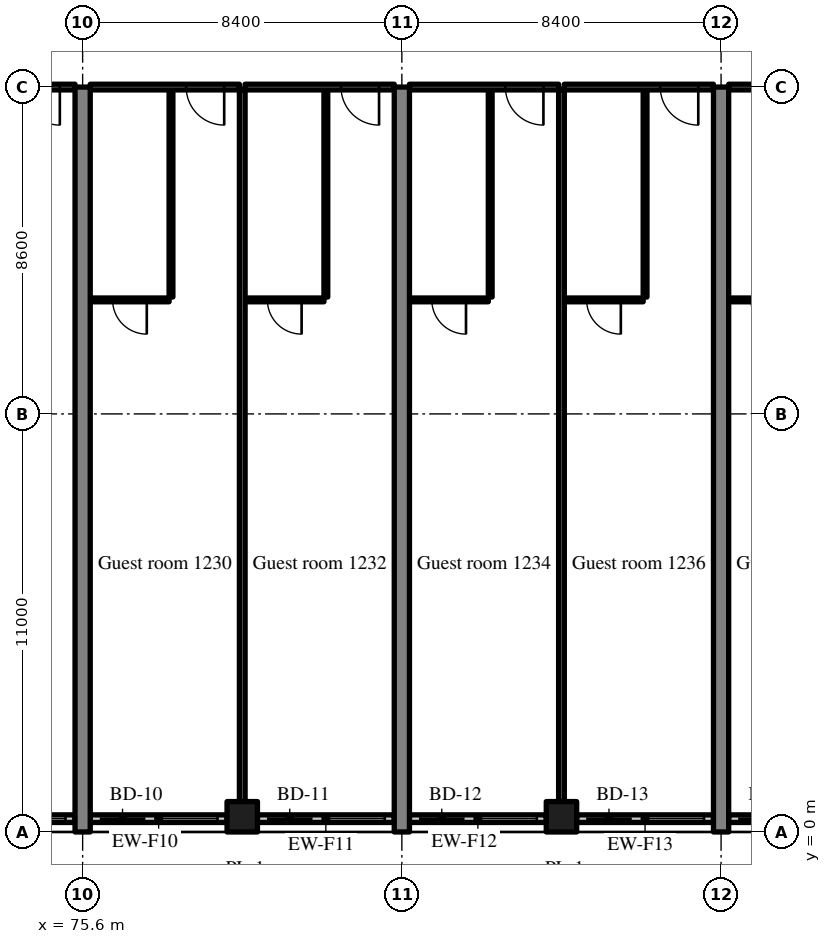
"""IFC4 building model, lengths in metres.
Left out: names, types, materials, properties, quantities, classifications, styles, units other than length and angle.
Written with IfcOpenShell. Run it as: python <this file> out.ifc"""

import sys

from ifc_helpers import new_model, si_unit, direction, frame, frame_2d, origin, origin_2d, place, context, subcontext, project, spatial, rectangle, extrude, source, transform, mapped, element, fill, save


model = new_model("IFC4")
c1 = context("Model", 3, precision=1e-05, world=origin(), true_north=direction((0.0, 1.0)))
c2 = subcontext(c1, "Body", "Model", "MODEL_VIEW")
j1 = project(units=[si_unit("LENGTHUNIT", "METRE"), si_unit("PLANEANGLEUNIT", "RADIAN")], contexts=[c1])
p1 = place(None, origin())
s1 = spatial("IfcSite", under=j1, at=p1, CompositionType="ELEMENT")
p2 = place(p1, origin())
s2 = spatial("IfcBuilding", under=s1, at=p2, CompositionType="ELEMENT")
p3 = place(p2, frame((0.0, 0.0, 54.4)))
s3 = spatial("IfcBuildingStorey", under=s2, at=p3, CompositionType="ELEMENT", Elevation=54.4)
m1 = source(origin(), c2, "Body", "SweptSolid", [
    extrude(rectangle(XDim=19.6, YDim=0.4, at=frame_2d((9.8, 0.0))), origin(), (0.0, 0.0, 1.0), 3.52),
])
for number, where, z_axis, x_axis in (
    (1, (75.6, 0.0, 0.0), (0.0, 0.0, 1.0), (0.0, 1.0, 0.0)),
    (2, (84.0, 0.0, 0.0), (0.0, 0.0, 1.0), (0.0, 1.0, 0.0)),
    (3, (92.4, 0.0, 0.0), (0.0, 0.0, 1.0), (0.0, 1.0, 0.0)),
):
    element("IfcWall", number, at=place(p3, frame(where, z_axis=z_axis, x_axis=x_axis)), inside=s3, PredefinedType="SHEAR", context=c2, shape_type="MappedRepresentation", body=[
        mapped(m1, transform((0.0, 0.0, 0.0), scale=1.0)),
    ])
m2 = source(origin(), c2, "Body", "SweptSolid", [
    extrude(rectangle(XDim=0.8, YDim=0.8, at=origin_2d()), origin(), (0.0, 0.0, 1.0), 3.52),
])
for number, where, z_axis, x_axis in (
    (4, (79.8, 0.4, 0.0), (0.0, 0.0, 1.0), (1.0, 0.0, 0.0)),
    (5, (88.2, 0.4, 0.0), (0.0, 0.0, 1.0), (1.0, 0.0, 0.0)),
):
    element("IfcColumn", number, at=place(p3, frame(where, z_axis=z_axis, x_axis=x_axis)), inside=s3, PredefinedType="COLUMN", context=c2, shape_type="MappedRepresentation", body=[
        mapped(m2, transform((0.0, 0.0, 0.0), scale=1.0)),
    ])
m3 = source(origin(), c2, "Body", "SweptSolid", [
    extrude(rectangle(XDim=3.6, YDim=0.2, at=frame_2d((1.8, 0.0))), origin(), (0.0, 0.0, 1.0), 2.82),
])
p4 = place(p3, frame((71.8, 0.35, 0.0), z_axis=(0.0, 0.0, 1.0), x_axis=(1.0, 0.0, 0.0)))
e6 = element("IfcWall", 6, at=p4, inside=s3, PredefinedType="SOLIDWALL", context=c2, shape_type="MappedRepresentation", body=[
    mapped(m3, transform((0.0, 0.0, 0.0), scale=1.0)),
])
m4 = source(origin(), c2, "Body", "SweptSolid", [
    extrude(rectangle(XDim=1.2, YDim=2.4, at=frame_2d((0.6, 1.2))), frame((0.0, 0.11, 0.0), z_axis=(0.0, -1.0, 0.0), x_axis=(1.0, 0.0, 0.0)), (0.0, 0.0, 1.0), 0.22),
])
p5 = place(p4, frame((0.25, 0.0, 0.0)))
e7 = element("IfcOpeningElement", 7, at=p5, cuts=e6, PredefinedType="OPENING", context=c2, shape_type="MappedRepresentation", body=[
    mapped(m4, transform((0.0, 0.0, 0.0), scale=1.0)),
])
m5 = source(origin(), c2, "Body", "SweptSolid", [
    extrude(rectangle(XDim=1.5, YDim=1.5, at=frame_2d((0.75, 0.75))), frame((0.0, 0.11, 0.0), z_axis=(0.0, -1.0, 0.0), x_axis=(1.0, 0.0, 0.0)), (0.0, 0.0, 1.0), 0.22),
])
p6 = place(p4, frame((1.85, 0.0, 0.9)))
e8 = element("IfcOpeningElement", 8, at=p6, cuts=e6, PredefinedType="OPENING", context=c2, shape_type="MappedRepresentation", body=[
    mapped(m5, transform((0.0, 0.0, 0.0), scale=1.0)),
])
p7 = place(p3, frame((75.8, 0.35, 0.0), z_axis=(0.0, 0.0, 1.0), x_axis=(1.0, 0.0, 0.0)))
e9 = element("IfcWall", 9, at=p7, inside=s3, PredefinedType="SOLIDWALL", context=c2, shape_type="MappedRepresentation", body=[
    mapped(m3, transform((0.0, 0.0, 0.0), scale=1.0)),
])
p8 = place(p7, frame((0.25, 0.0, 0.0)))
e10 = element("IfcOpeningElement", 10, at=p8, cuts=e9, PredefinedType="OPENING", context=c2, shape_type="MappedRepresentation", body=[
    mapped(m4, transform((0.0, 0.0, 0.0), scale=1.0)),
])
p9 = place(p7, frame((1.85, 0.0, 0.9)))
e11 = element("IfcOpeningElement", 11, at=p9, cuts=e9, PredefinedType="OPENING", context=c2, shape_type="MappedRepresentation", body=[
    mapped(m5, transform((0.0, 0.0, 0.0), scale=1.0)),
])
m6 = source(origin(), c2, "Body", "SweptSolid", [
    extrude(rectangle(XDim=3.6, YDim=0.2, at=frame_2d((1.8, 0.0))), origin(), (0.0, 0.0, 1.0), 2.82),
])
p10 = place(p3, frame((80.2, 0.35, 0.0), z_axis=(0.0, 0.0, 1.0), x_axis=(1.0, 0.0, 0.0)))
e12 = element("IfcWall", 12, at=p10, inside=s3, PredefinedType="SOLIDWALL", context=c2, shape_type="MappedRepresentation", body=[
    mapped(m6, transform((0.0, 0.0, 0.0), scale=1.0)),
])
p11 = place(p10, frame((0.25, 0.0, 0.0)))
e13 = element("IfcOpeningElement", 13, at=p11, cuts=e12, PredefinedType="OPENING", context=c2, shape_type="MappedRepresentation", body=[
    mapped(m4, transform((0.0, 0.0, 0.0), scale=1.0)),
])
p12 = place(p10, frame((1.85, 0.0, 0.9)))
e14 = element("IfcOpeningElement", 14, at=p12, cuts=e12, PredefinedType="OPENING", context=c2, shape_type="MappedRepresentation", body=[
    mapped(m5, transform((0.0, 0.0, 0.0), scale=1.0)),
])
p13 = place(p3, frame((84.2, 0.35, 0.0), z_axis=(0.0, 0.0, 1.0), x_axis=(1.0, 0.0, 0.0)))
e15 = element("IfcWall", 15, at=p13, inside=s3, PredefinedType="SOLIDWALL", context=c2, shape_type="MappedRepresentation", body=[
    mapped(m6, transform((0.0, 0.0, 0.0), scale=1.0)),
])
p14 = place(p13, frame((0.25, 0.0, 0.0)))
e16 = element("IfcOpeningElement", 16, at=p14, cuts=e15, PredefinedType="OPENING", context=c2, shape_type="MappedRepresentation", body=[
    mapped(m4, transform((0.0, 0.0, 0.0), scale=1.0)),
])
p15 = place(p13, frame((1.85, 0.0, 0.9)))
e17 = element("IfcOpeningElement", 17, at=p15, cuts=e15, PredefinedType="OPENING", context=c2, shape_type="MappedRepresentation", body=[
    mapped(m5, transform((0.0, 0.0, 0.0), scale=1.0)),
])
p16 = place(p3, frame((88.6, 0.35, 0.0), z_axis=(0.0, 0.0, 1.0), x_axis=(1.0, 0.0, 0.0)))
e18 = element("IfcWall", 18, at=p16, inside=s3, PredefinedType="SOLIDWALL", context=c2, shape_type="MappedRepresentation", body=[
    mapped(m3, transform((0.0, 0.0, 0.0), scale=1.0)),
])
p17 = place(p16, frame((0.25, 0.0, 0.0)))
e19 = element("IfcOpeningElement", 19, at=p17, cuts=e18, PredefinedType="OPENING", context=c2, shape_type="MappedRepresentation", body=[
    mapped(m4, transform((0.0, 0.0, 0.0), scale=1.0)),
])
p18 = place(p16, frame((1.85, 0.0, 0.9)))
e20 = element("IfcOpeningElement", 20, at=p18, cuts=e18, PredefinedType="OPENING", context=c2, shape_type="MappedRepresentation", body=[
    mapped(m5, transform((0.0, 0.0, 0.0), scale=1.0)),
])
m7 = source(origin(), c2, "Body", "SweptSolid", [
    extrude(rectangle(XDim=4.055, YDim=0.2, at=frame_2d((2.027, 0.0))), origin(), (0.0, 0.0, 1.0), 2.82),
])
p19 = place(p3, frame((92.6, 0.35, 0.0), z_axis=(0.0, 0.0, 1.0), x_axis=(1.0, 0.0, 0.0)))
e21 = element("IfcWall", 21, at=p19, inside=s3, PredefinedType="SOLIDWALL", context=c2, shape_type="MappedRepresentation", body=[
    mapped(m7, transform((0.0, 0.0, 0.0), scale=1.0)),
])
p20 = place(p19, frame((0.25, 0.0, 0.0)))
e22 = element("IfcOpeningElement", 22, at=p20, cuts=e21, PredefinedType="OPENING", context=c2, shape_type="MappedRepresentation", body=[
    mapped(m4, transform((0.0, 0.0, 0.0), scale=1.0)),
])
p21 = place(p19, frame((2.305, 0.0, 0.9)))
e23 = element("IfcOpeningElement", 23, at=p21, cuts=e21, PredefinedType="OPENING", context=c2, shape_type="MappedRepresentation", body=[
    mapped(m5, transform((0.0, 0.0, 0.0), scale=1.0)),
])
m8 = source(origin(), c2, "Body", "SweptSolid", [
    extrude(rectangle(XDim=8.0, YDim=0.15, at=frame_2d((4.0, 0.0))), origin(), (0.0, 0.0, 1.0), 2.82),
])
p22 = place(p3, frame((67.4, 19.6, 0.0), z_axis=(0.0, 0.0, 1.0), x_axis=(1.0, 0.0, 0.0)))
e24 = element("IfcWall", 24, at=p22, inside=s3, PredefinedType="PARTITIONING", context=c2, shape_type="MappedRepresentation", body=[
    mapped(m8, transform((0.0, 0.0, 0.0), scale=1.0)),
])
m9 = source(origin(), c2, "Body", "SweptSolid", [
    extrude(rectangle(XDim=1.0, YDim=2.1, at=frame_2d((0.5, 1.05))), frame((0.0, 0.085, 0.0), z_axis=(0.0, -1.0, 0.0), x_axis=(1.0, 0.0, 0.0)), (0.0, 0.0, 1.0), 0.17),
])
p23 = place(p22, frame((6.6, 0.0, 0.0)))
e25 = element("IfcOpeningElement", 25, at=p23, cuts=e24, PredefinedType="OPENING", context=c2, shape_type="MappedRepresentation", body=[
    mapped(m9, transform((0.0, 0.0, 0.0), scale=1.0)),
])
m10 = source(origin(), c2, "Body", "SweptSolid", [
    extrude(rectangle(XDim=5.45, YDim=0.1, at=frame_2d((2.725, 0.0))), origin(), (0.0, 0.0, 1.0), 3.52),
])
p24 = place(p3, frame((77.925, 14.075, 0.0), z_axis=(0.0, 0.0, 1.0), x_axis=(0.0, 1.0, 0.0)))
e26 = element("IfcWall", 26, at=p24, inside=s3, PredefinedType="PARTITIONING", context=c2, shape_type="MappedRepresentation", body=[
    mapped(m10, transform((0.0, 0.0, 0.0), scale=1.0)),
])
m11 = source(origin(), c2, "Body", "SweptSolid", [
    extrude(rectangle(XDim=2.075, YDim=0.1, at=frame_2d((1.038, 0.0))), origin(), (0.0, 0.0, 1.0), 3.52),
])
p25 = place(p3, frame((75.8, 14.0, 0.0), z_axis=(0.0, 0.0, 1.0), x_axis=(1.0, 0.0, 0.0)))
e27 = element("IfcWall", 27, at=p25, inside=s3, PredefinedType="PARTITIONING", context=c2, shape_type="MappedRepresentation", body=[
    mapped(m11, transform((0.0, 0.0, 0.0), scale=1.0)),
])
m12 = source(origin(), c2, "Body", "SweptSolid", [
    extrude(rectangle(XDim=0.9, YDim=2.1, at=frame_2d((0.45, 1.05))), frame((0.0, 0.06, 0.0), z_axis=(0.0, -1.0, 0.0), x_axis=(1.0, 0.0, 0.0)), (0.0, 0.0, 1.0), 0.12),
])
p26 = place(p25, frame((0.588, 0.0, 0.0)))
e28 = element("IfcOpeningElement", 28, at=p26, cuts=e27, PredefinedType="OPENING", context=c2, shape_type="MappedRepresentation", body=[
    mapped(m12, transform((0.0, 0.0, 0.0), scale=1.0)),
])
m13 = source(origin(), c2, "Body", "SweptSolid", [
    extrude(rectangle(XDim=3.925, YDim=0.15, at=frame_2d((1.962, 0.0))), origin(), (0.0, 0.0, 1.0), 2.82),
])
p27 = place(p3, frame((75.8, 19.6, 0.0), z_axis=(0.0, 0.0, 1.0), x_axis=(1.0, 0.0, 0.0)))
e29 = element("IfcWall", 29, at=p27, inside=s3, PredefinedType="PARTITIONING", context=c2, shape_type="MappedRepresentation", body=[
    mapped(m13, transform((0.0, 0.0, 0.0), scale=1.0)),
])
p28 = place(p27, frame((2.525, 0.0, 0.0)))
e30 = element("IfcOpeningElement", 30, at=p28, cuts=e29, PredefinedType="OPENING", context=c2, shape_type="MappedRepresentation", body=[
    mapped(m9, transform((0.0, 0.0, 0.0), scale=1.0)),
])
p29 = place(p3, frame((82.0, 14.075, 0.0), z_axis=(0.0, 0.0, 1.0), x_axis=(0.0, 1.0, 0.0)))
e31 = element("IfcWall", 31, at=p29, inside=s3, PredefinedType="PARTITIONING", context=c2, shape_type="MappedRepresentation", body=[
    mapped(m10, transform((0.0, 0.0, 0.0), scale=1.0)),
])
p30 = place(p3, frame((79.875, 14.0, 0.0), z_axis=(0.0, 0.0, 1.0), x_axis=(1.0, 0.0, 0.0)))
e32 = element("IfcWall", 32, at=p30, inside=s3, PredefinedType="PARTITIONING", context=c2, shape_type="MappedRepresentation", body=[
    mapped(m11, transform((0.0, 0.0, 0.0), scale=1.0)),
])
p31 = place(p30, frame((0.587, 0.0, 0.0)))
e33 = element("IfcOpeningElement", 33, at=p31, cuts=e32, PredefinedType="OPENING", context=c2, shape_type="MappedRepresentation", body=[
    mapped(m12, transform((0.0, 0.0, 0.0), scale=1.0)),
])
p32 = place(p3, frame((79.875, 19.6, 0.0), z_axis=(0.0, 0.0, 1.0), x_axis=(1.0, 0.0, 0.0)))
e34 = element("IfcWall", 34, at=p32, inside=s3, PredefinedType="PARTITIONING", context=c2, shape_type="MappedRepresentation", body=[
    mapped(m13, transform((0.0, 0.0, 0.0), scale=1.0)),
])
p33 = place(p32, frame((2.525, 0.0, 0.0)))
e35 = element("IfcOpeningElement", 35, at=p33, cuts=e34, PredefinedType="OPENING", context=c2, shape_type="MappedRepresentation", body=[
    mapped(m9, transform((0.0, 0.0, 0.0), scale=1.0)),
])
m14 = source(origin(), c2, "Body", "SweptSolid", [
    extrude(rectangle(XDim=18.725, YDim=0.15, at=frame_2d((9.362, 0.0))), origin(), (0.0, 0.0, 1.0), 3.52),
])
p34 = place(p3, frame((79.8, 0.8, 0.0), z_axis=(0.0, 0.0, 1.0), x_axis=(0.0, 1.0, 0.0)))
e36 = element("IfcWall", 36, at=p34, inside=s3, PredefinedType="PARTITIONING", context=c2, shape_type="MappedRepresentation", body=[
    mapped(m14, transform((0.0, 0.0, 0.0), scale=1.0)),
])
p35 = place(p3, frame((86.325, 14.075, 0.0), z_axis=(0.0, 0.0, 1.0), x_axis=(0.0, 1.0, 0.0)))
e37 = element("IfcWall", 37, at=p35, inside=s3, PredefinedType="PARTITIONING", context=c2, shape_type="MappedRepresentation", body=[
    mapped(m10, transform((0.0, 0.0, 0.0), scale=1.0)),
])
p36 = place(p3, frame((84.2, 14.0, 0.0), z_axis=(0.0, 0.0, 1.0), x_axis=(1.0, 0.0, 0.0)))
e38 = element("IfcWall", 38, at=p36, inside=s3, PredefinedType="PARTITIONING", context=c2, shape_type="MappedRepresentation", body=[
    mapped(m11, transform((0.0, 0.0, 0.0), scale=1.0)),
])
p37 = place(p36, frame((0.588, 0.0, 0.0)))
e39 = element("IfcOpeningElement", 39, at=p37, cuts=e38, PredefinedType="OPENING", context=c2, shape_type="MappedRepresentation", body=[
    mapped(m12, transform((0.0, 0.0, 0.0), scale=1.0)),
])
p38 = place(p3, frame((84.2, 19.6, 0.0), z_axis=(0.0, 0.0, 1.0), x_axis=(1.0, 0.0, 0.0)))
e40 = element("IfcWall", 40, at=p38, inside=s3, PredefinedType="PARTITIONING", context=c2, shape_type="MappedRepresentation", body=[
    mapped(m13, transform((0.0, 0.0, 0.0), scale=1.0)),
])
p39 = place(p38, frame((2.525, 0.0, 0.0)))
e41 = element("IfcOpeningElement", 41, at=p39, cuts=e40, PredefinedType="OPENING", context=c2, shape_type="MappedRepresentation", body=[
    mapped(m9, transform((0.0, 0.0, 0.0), scale=1.0)),
])
p40 = place(p3, frame((90.4, 14.075, 0.0), z_axis=(0.0, 0.0, 1.0), x_axis=(0.0, 1.0, 0.0)))
e42 = element("IfcWall", 42, at=p40, inside=s3, PredefinedType="PARTITIONING", context=c2, shape_type="MappedRepresentation", body=[
    mapped(m10, transform((0.0, 0.0, 0.0), scale=1.0)),
])
m15 = source(origin(), c2, "Body", "SweptSolid", [
    extrude(rectangle(XDim=2.075, YDim=0.1, at=frame_2d((1.038, 0.0))), origin(), (0.0, 0.0, 1.0), 3.52),
])
p41 = place(p3, frame((88.275, 14.0, 0.0), z_axis=(0.0, 0.0, 1.0), x_axis=(1.0, 0.0, 0.0)))
e43 = element("IfcWall", 43, at=p41, inside=s3, PredefinedType="PARTITIONING", context=c2, shape_type="MappedRepresentation", body=[
    mapped(m15, transform((0.0, 0.0, 0.0), scale=1.0)),
])
p42 = place(p41, frame((0.587, 0.0, 0.0)))
e44 = element("IfcOpeningElement", 44, at=p42, cuts=e43, PredefinedType="OPENING", context=c2, shape_type="MappedRepresentation", body=[
    mapped(m12, transform((0.0, 0.0, 0.0), scale=1.0)),
])
p43 = place(p3, frame((88.275, 19.6, 0.0), z_axis=(0.0, 0.0, 1.0), x_axis=(1.0, 0.0, 0.0)))
e45 = element("IfcWall", 45, at=p43, inside=s3, PredefinedType="PARTITIONING", context=c2, shape_type="MappedRepresentation", body=[
    mapped(m13, transform((0.0, 0.0, 0.0), scale=1.0)),
])
p44 = place(p43, frame((2.525, 0.0, 0.0)))
e46 = element("IfcOpeningElement", 46, at=p44, cuts=e45, PredefinedType="OPENING", context=c2, shape_type="MappedRepresentation", body=[
    mapped(m9, transform((0.0, 0.0, 0.0), scale=1.0)),
])
p45 = place(p3, frame((88.2, 0.8, 0.0), z_axis=(0.0, 0.0, 1.0), x_axis=(0.0, 1.0, 0.0)))
e47 = element("IfcWall", 47, at=p45, inside=s3, PredefinedType="PARTITIONING", context=c2, shape_type="MappedRepresentation", body=[
    mapped(m14, transform((0.0, 0.0, 0.0), scale=1.0)),
])
p46 = place(p3, frame((92.6, 14.0, 0.0), z_axis=(0.0, 0.0, 1.0), x_axis=(1.0, 0.0, 0.0)))
e48 = element("IfcWall", 48, at=p46, inside=s3, PredefinedType="PARTITIONING", context=c2, shape_type="MappedRepresentation", body=[
    mapped(m11, transform((0.0, 0.0, 0.0), scale=1.0)),
])
p47 = place(p46, frame((0.587, 0.0, 0.0)))
e49 = element("IfcOpeningElement", 49, at=p47, cuts=e48, PredefinedType="OPENING", context=c2, shape_type="MappedRepresentation", body=[
    mapped(m12, transform((0.0, 0.0, 0.0), scale=1.0)),
])
m16 = source(origin(), c2, "Body", "SweptSolid", [
    extrude(rectangle(XDim=3.925, YDim=0.15, at=frame_2d((1.962, 0.0))), origin(), (0.0, 0.0, 1.0), 2.82),
])
p48 = place(p3, frame((92.6, 19.6, 0.0), z_axis=(0.0, 0.0, 1.0), x_axis=(1.0, 0.0, 0.0)))
e50 = element("IfcWall", 50, at=p48, inside=s3, PredefinedType="PARTITIONING", context=c2, shape_type="MappedRepresentation", body=[
    mapped(m16, transform((0.0, 0.0, 0.0), scale=1.0)),
])
p49 = place(p48, frame((2.525, 0.0, 0.0)))
e51 = element("IfcOpeningElement", 51, at=p49, cuts=e50, PredefinedType="OPENING", context=c2, shape_type="MappedRepresentation", body=[
    mapped(m9, transform((0.0, 0.0, 0.0), scale=1.0)),
])
m17 = source(origin(), c2, "Body", "SweptSolid", [
    extrude(rectangle(XDim=1.5, YDim=1.5, at=frame_2d((0.75, 0.75))), frame((0.0, 0.03, 0.0), z_axis=(0.0, -1.0, 0.0), x_axis=(1.0, 0.0, 0.0)), (0.0, 0.0, 1.0), 0.06),
])
p50 = place(p6, origin())
e52 = element("IfcWindow", 52, at=p50, inside=s3, PartitioningType="SINGLE_PANEL", PredefinedType="WINDOW", context=c2, shape_type="MappedRepresentation", body=[
    mapped(m17, transform((0.0, 0.0, 0.0), scale=1.0)),
])
fill(e8, e52)
m18 = source(origin(), c2, "Body", "SweptSolid", [
    extrude(rectangle(XDim=1.2, YDim=2.4, at=frame_2d((0.6, 1.2))), frame((0.0, 0.025, 0.0), z_axis=(0.0, -1.0, 0.0), x_axis=(1.0, 0.0, 0.0)), (0.0, 0.0, 1.0), 0.05),
])
p51 = place(p8, origin())
e53 = element("IfcDoor", 53, at=p51, inside=s3, OperationType="SLIDING_TO_RIGHT", PredefinedType="DOOR", context=c2, shape_type="MappedRepresentation", body=[
    mapped(m18, transform((0.0, 0.0, 0.0), scale=1.0)),
])
fill(e10, e53)
p52 = place(p9, origin())
e54 = element("IfcWindow", 54, at=p52, inside=s3, PartitioningType="SINGLE_PANEL", PredefinedType="WINDOW", context=c2, shape_type="MappedRepresentation", body=[
    mapped(m17, transform((0.0, 0.0, 0.0), scale=1.0)),
])
fill(e11, e54)
p53 = place(p11, origin())
e55 = element("IfcDoor", 55, at=p53, inside=s3, OperationType="SLIDING_TO_LEFT", PredefinedType="DOOR", context=c2, shape_type="MappedRepresentation", body=[
    mapped(m18, transform((0.0, 0.0, 0.0), scale=1.0)),
])
fill(e13, e55)
p54 = place(p12, origin())
e56 = element("IfcWindow", 56, at=p54, inside=s3, PartitioningType="SINGLE_PANEL", PredefinedType="WINDOW", context=c2, shape_type="MappedRepresentation", body=[
    mapped(m17, transform((0.0, 0.0, 0.0), scale=1.0)),
])
fill(e14, e56)
p55 = place(p14, origin())
e57 = element("IfcDoor", 57, at=p55, inside=s3, OperationType="SLIDING_TO_RIGHT", PredefinedType="DOOR", context=c2, shape_type="MappedRepresentation", body=[
    mapped(m18, transform((0.0, 0.0, 0.0), scale=1.0)),
])
fill(e16, e57)
p56 = place(p15, origin())
e58 = element("IfcWindow", 58, at=p56, inside=s3, PartitioningType="SINGLE_PANEL", PredefinedType="WINDOW", context=c2, shape_type="MappedRepresentation", body=[
    mapped(m17, transform((0.0, 0.0, 0.0), scale=1.0)),
])
fill(e17, e58)
p57 = place(p17, origin())
e59 = element("IfcDoor", 59, at=p57, inside=s3, OperationType="SLIDING_TO_LEFT", PredefinedType="DOOR", context=c2, shape_type="MappedRepresentation", body=[
    mapped(m18, transform((0.0, 0.0, 0.0), scale=1.0)),
])
fill(e19, e59)
p58 = place(p18, origin())
e60 = element("IfcWindow", 60, at=p58, inside=s3, PartitioningType="SINGLE_PANEL", PredefinedType="WINDOW", context=c2, shape_type="MappedRepresentation", body=[
    mapped(m17, transform((0.0, 0.0, 0.0), scale=1.0)),
])
fill(e20, e60)
p59 = place(p20, origin())
e61 = element("IfcDoor", 61, at=p59, inside=s3, OperationType="SLIDING_TO_RIGHT", PredefinedType="DOOR", context=c2, shape_type="MappedRepresentation", body=[
    mapped(m18, transform((0.0, 0.0, 0.0), scale=1.0)),
])
fill(e22, e61)
m19 = source(origin(), c2, "Body", "SweptSolid", [
    extrude(rectangle(XDim=1.0, YDim=2.1, at=frame_2d((0.5, 1.05))), frame((0.0, 0.025, 0.0), z_axis=(0.0, -1.0, 0.0), x_axis=(1.0, 0.0, 0.0)), (0.0, 0.0, 1.0), 0.05),
])
p60 = place(p23, origin())
e62 = element("IfcDoor", 62, at=p60, inside=s3, OperationType="SINGLE_SWING_RIGHT", PredefinedType="DOOR", context=c2, shape_type="MappedRepresentation", body=[
    mapped(m19, transform((0.0, 0.0, 0.0), scale=1.0)),
])
fill(e25, e62)
m20 = source(origin(), c2, "Body", "SweptSolid", [
    extrude(rectangle(XDim=0.9, YDim=2.1, at=frame_2d((0.45, 1.05))), frame((0.0, 0.025, 0.0), z_axis=(0.0, -1.0, 0.0), x_axis=(1.0, 0.0, 0.0)), (0.0, 0.0, 1.0), 0.05),
])
p61 = place(p26, origin())
e63 = element("IfcDoor", 63, at=p61, inside=s3, OperationType="SINGLE_SWING_RIGHT", PredefinedType="DOOR", context=c2, shape_type="MappedRepresentation", body=[
    mapped(m20, transform((0.0, 0.0, 0.0), scale=1.0)),
])
fill(e28, e63)
p62 = place(p28, origin())
e64 = element("IfcDoor", 64, at=p62, inside=s3, OperationType="SINGLE_SWING_RIGHT", PredefinedType="DOOR", context=c2, shape_type="MappedRepresentation", body=[
    mapped(m19, transform((0.0, 0.0, 0.0), scale=1.0)),
])
fill(e30, e64)
p63 = place(p31, origin())
e65 = element("IfcDoor", 65, at=p63, inside=s3, OperationType="SINGLE_SWING_RIGHT", PredefinedType="DOOR", context=c2, shape_type="MappedRepresentation", body=[
    mapped(m20, transform((0.0, 0.0, 0.0), scale=1.0)),
])
fill(e33, e65)
p64 = place(p33, origin())
e66 = element("IfcDoor", 66, at=p64, inside=s3, OperationType="SINGLE_SWING_RIGHT", PredefinedType="DOOR", context=c2, shape_type="MappedRepresentation", body=[
    mapped(m19, transform((0.0, 0.0, 0.0), scale=1.0)),
])
fill(e35, e66)
p65 = place(p37, origin())
e67 = element("IfcDoor", 67, at=p65, inside=s3, OperationType="SINGLE_SWING_RIGHT", PredefinedType="DOOR", context=c2, shape_type="MappedRepresentation", body=[
    mapped(m20, transform((0.0, 0.0, 0.0), scale=1.0)),
])
fill(e39, e67)
p66 = place(p39, origin())
e68 = element("IfcDoor", 68, at=p66, inside=s3, OperationType="SINGLE_SWING_RIGHT", PredefinedType="DOOR", context=c2, shape_type="MappedRepresentation", body=[
    mapped(m19, transform((0.0, 0.0, 0.0), scale=1.0)),
])
fill(e41, e68)
p67 = place(p42, origin())
e69 = element("IfcDoor", 69, at=p67, inside=s3, OperationType="SINGLE_SWING_RIGHT", PredefinedType="DOOR", context=c2, shape_type="MappedRepresentation", body=[
    mapped(m20, transform((0.0, 0.0, 0.0), scale=1.0)),
])
fill(e44, e69)
p68 = place(p44, origin())
e70 = element("IfcDoor", 70, at=p68, inside=s3, OperationType="SINGLE_SWING_RIGHT", PredefinedType="DOOR", context=c2, shape_type="MappedRepresentation", body=[
    mapped(m19, transform((0.0, 0.0, 0.0), scale=1.0)),
])
fill(e46, e70)
p69 = place(p47, origin())
e71 = element("IfcDoor", 71, at=p69, inside=s3, OperationType="SINGLE_SWING_RIGHT", PredefinedType="DOOR", context=c2, shape_type="MappedRepresentation", body=[
    mapped(m20, transform((0.0, 0.0, 0.0), scale=1.0)),
])
fill(e49, e71)
save(model, sys.argv[1])
